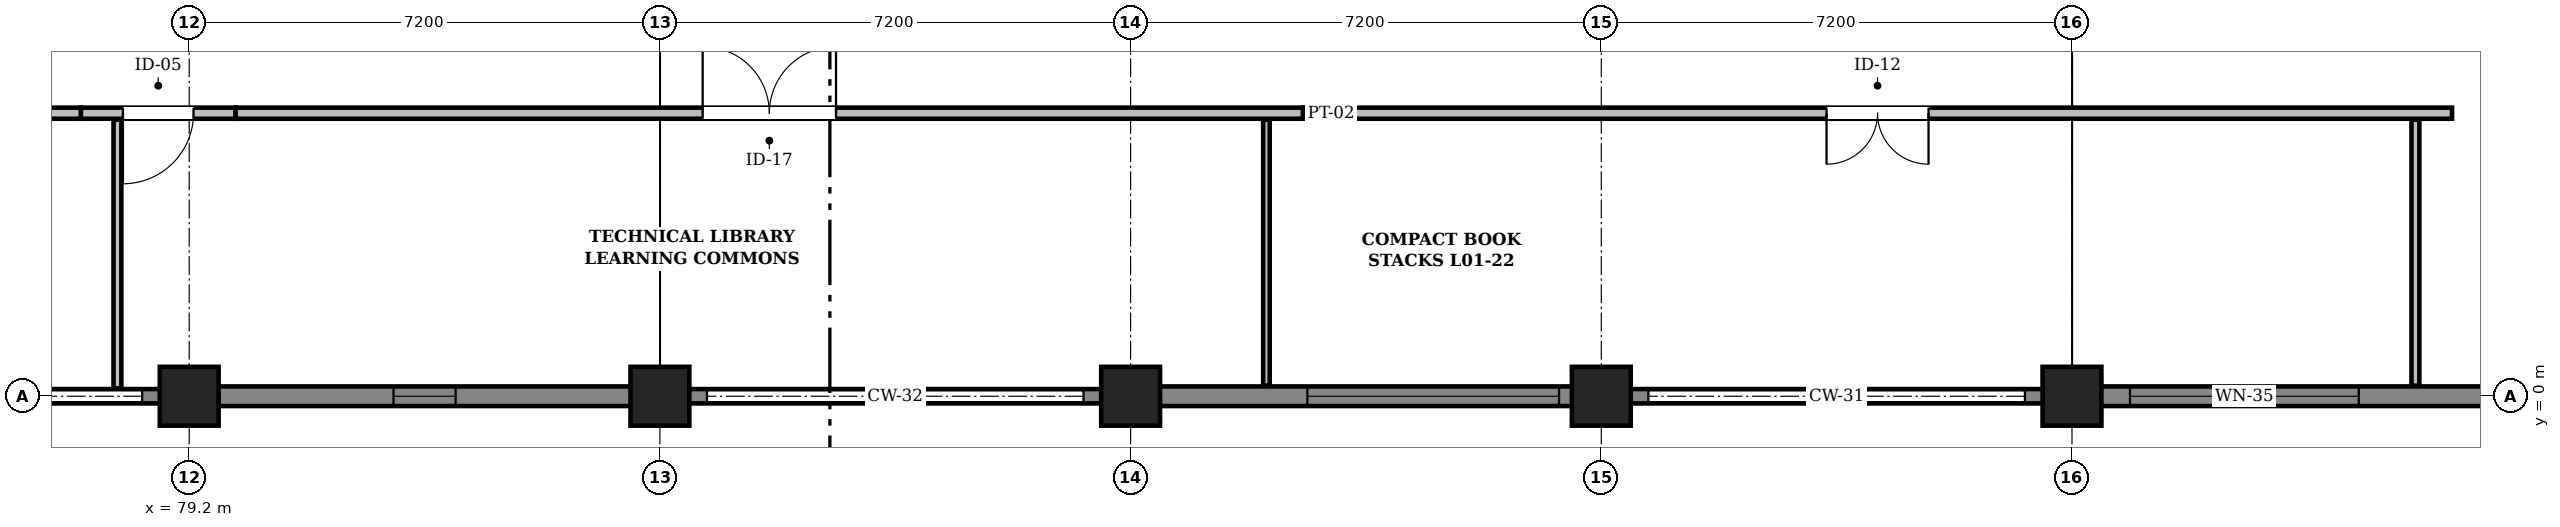
"""IFC4 building model, lengths in metres.
Left out: names, types, materials, properties, quantities, classifications, styles, units other than length and angle.
Written with IfcOpenShell. Run it as: python <this file> out.ifc"""

import sys

from ifc_helpers import new_model, si_unit, direction, frame, frame_2d, origin, origin_2d, place, context, subcontext, project, spatial, rectangle, extrude, element, fill, save


model = new_model("IFC4")
c1 = context("Model", 3, precision=1e-05, world=origin(), true_north=direction((0.0, 1.0)))
c2 = subcontext(c1, "Body", "Model", "MODEL_VIEW")
j1 = project(units=[si_unit("LENGTHUNIT", "METRE"), si_unit("PLANEANGLEUNIT", "RADIAN")], contexts=[c1])
p1 = place(None, origin())
s1 = spatial("IfcSite", under=j1, at=p1, CompositionType="ELEMENT")
p2 = place(p1, origin())
s2 = spatial("IfcBuilding", under=s1, at=p2, CompositionType="ELEMENT")
p3 = place(p2, frame((0.0, 0.0, 4.8)))
s3 = spatial("IfcBuildingStorey", under=s2, at=p3, CompositionType="ELEMENT", Elevation=4.8)
for number, where, z_axis, x_axis in (
    (1, (79.2, 0.0, 0.0), (0.0, 0.0, 1.0), (1.0, 0.0, 0.0)),
    (2, (86.4, 0.0, 0.0), (0.0, 0.0, 1.0), (1.0, 0.0, 0.0)),
    (3, (93.6, 0.0, 0.0), (0.0, 0.0, 1.0), (1.0, 0.0, 0.0)),
    (4, (100.8, 0.0, 0.0), (0.0, 0.0, 1.0), (1.0, 0.0, 0.0)),
    (5, (108.0, 0.0, 0.0), (0.0, 0.0, 1.0), (1.0, 0.0, 0.0)),
):
    element("IfcColumn", number, at=place(p3, frame(where, z_axis=z_axis, x_axis=x_axis)), inside=s3, PredefinedType="COLUMN", context=c2, shape_type="SweptSolid", body=[
        extrude(rectangle(XDim=0.9, YDim=0.9, at=origin_2d()), origin(), (0.0, 0.0, 1.0), 4.8),
    ])
p4 = place(p3, frame((115.2, 0.0, 0.0), z_axis=(0.0, 0.0, 1.0), x_axis=(-1.0, 0.0, 0.0)))
e6 = element("IfcWall", 6, at=p4, inside=s3, PredefinedType="SOLIDWALL", context=c2, shape_type="SweptSolid", body=[
    extrude(rectangle(XDim=7.2, YDim=0.3, at=frame_2d((3.6, 0.0))), origin(), (0.0, 0.0, 1.0), 4.52),
])
p5 = place(p4, frame((2.813, 0.0, 0.95)))
e7 = element("IfcOpeningElement", 7, at=p5, cuts=e6, PredefinedType="OPENING", context=c2, shape_type="SweptSolid", body=[
    extrude(rectangle(XDim=3.5, YDim=1.8, at=frame_2d((1.75, 0.9))), frame((0.0, 0.162, 0.0), z_axis=(0.0, -1.0, 0.0), x_axis=(1.0, 0.0, 0.0)), (0.0, 0.0, 1.0), 0.324),
])
p6 = place(p3, frame((108.0, 0.0, 0.0), z_axis=(0.0, 0.0, 1.0), x_axis=(-1.0, 0.0, 0.0)))
e8 = element("IfcWall", 8, at=p6, inside=s3, PredefinedType="SOLIDWALL", context=c2, shape_type="SweptSolid", body=[
    extrude(rectangle(XDim=7.2, YDim=0.22, at=frame_2d((3.6, 0.0))), origin(), (0.0, 0.0, 1.0), 1.24),
])
p7 = place(p3, frame((100.8, 0.0, 0.0), z_axis=(0.0, 0.0, 1.0), x_axis=(-1.0, 0.0, 0.0)))
e9 = element("IfcWall", 9, at=p7, inside=s3, PredefinedType="SOLIDWALL", context=c2, shape_type="SweptSolid", body=[
    extrude(rectangle(XDim=7.2, YDim=0.3, at=frame_2d((3.6, 0.0))), origin(), (0.0, 0.0, 1.0), 4.52),
])
p8 = place(p7, frame((0.646, 0.0, 0.95)))
e10 = element("IfcOpeningElement", 10, at=p8, cuts=e9, PredefinedType="OPENING", context=c2, shape_type="SweptSolid", body=[
    extrude(rectangle(XDim=3.85, YDim=1.8, at=frame_2d((1.925, 0.9))), frame((0.0, 0.162, 0.0), z_axis=(0.0, -1.0, 0.0), x_axis=(1.0, 0.0, 0.0)), (0.0, 0.0, 1.0), 0.324),
])
p9 = place(p3, frame((93.6, 0.0, 0.0), z_axis=(0.0, 0.0, 1.0), x_axis=(-1.0, 0.0, 0.0)))
e11 = element("IfcWall", 11, at=p9, inside=s3, PredefinedType="SOLIDWALL", context=c2, shape_type="SweptSolid", body=[
    extrude(rectangle(XDim=7.2, YDim=0.22, at=frame_2d((3.6, 0.0))), origin(), (0.0, 0.0, 1.0), 1.24),
])
p10 = place(p3, frame((86.4, 0.0, 0.0), z_axis=(0.0, 0.0, 1.0), x_axis=(-1.0, 0.0, 0.0)))
e12 = element("IfcWall", 12, at=p10, inside=s3, PredefinedType="SOLIDWALL", context=c2, shape_type="SweptSolid", body=[
    extrude(rectangle(XDim=7.2, YDim=0.3, at=frame_2d((3.6, 0.0))), origin(), (0.0, 0.0, 1.0), 4.52),
])
p11 = place(p10, frame((3.125, 0.0, 0.95)))
e13 = element("IfcOpeningElement", 13, at=p11, cuts=e12, PredefinedType="OPENING", context=c2, shape_type="SweptSolid", body=[
    extrude(rectangle(XDim=0.95, YDim=2.05, at=frame_2d((0.475, 1.025))), frame((0.0, 0.162, 0.0), z_axis=(0.0, -1.0, 0.0), x_axis=(1.0, 0.0, 0.0)), (0.0, 0.0, 1.0), 0.324),
])
p12 = place(p3, frame((79.2, 0.0, 0.0), z_axis=(0.0, 0.0, 1.0), x_axis=(-1.0, 0.0, 0.0)))
e14 = element("IfcWall", 14, at=p12, inside=s3, PredefinedType="SOLIDWALL", context=c2, shape_type="SweptSolid", body=[
    extrude(rectangle(XDim=7.2, YDim=0.22, at=frame_2d((3.6, 0.0))), origin(), (0.0, 0.0, 1.0), 1.24),
])
p13 = place(p3, frame((77.542, 4.33, 0.0), z_axis=(0.0, 0.0, 1.0), x_axis=(1.0, 0.0, 0.0)))
e15 = element("IfcWall", 15, at=p13, inside=s3, PredefinedType="PARTITIONING", context=c2, shape_type="SweptSolid", body=[
    extrude(rectangle(XDim=2.368, YDim=0.17, at=frame_2d((1.184, 0.0))), origin(), (0.0, 0.0, 1.0), 4.46),
])
p14 = place(p13, frame((0.644, 0.0, 0.0)))
e16 = element("IfcOpeningElement", 16, at=p14, cuts=e15, PredefinedType="OPENING", context=c2, shape_type="SweptSolid", body=[
    extrude(rectangle(XDim=1.08, YDim=2.2, at=frame_2d((0.54, 1.1))), frame((0.0, 0.097, 0.0), z_axis=(0.0, -1.0, 0.0), x_axis=(1.0, 0.0, 0.0)), (0.0, 0.0, 1.0), 0.194),
])
p15 = place(p3, frame((79.91, 4.33, 0.0), z_axis=(0.0, 0.0, 1.0), x_axis=(1.0, 0.0, 0.0)))
e17 = element("IfcWall", 17, at=p15, inside=s3, PredefinedType="PARTITIONING", context=c2, shape_type="SweptSolid", body=[
    extrude(rectangle(XDim=16.328, YDim=0.17, at=frame_2d((8.164, 0.0))), origin(), (0.0, 0.0, 1.0), 4.46),
])
p16 = place(p15, frame((7.144, 0.0, 0.0)))
e18 = element("IfcOpeningElement", 18, at=p16, cuts=e17, PredefinedType="OPENING", context=c2, shape_type="SweptSolid", body=[
    extrude(rectangle(XDim=2.04, YDim=2.34, at=frame_2d((1.02, 1.17))), frame((0.0, 0.097, 0.0), z_axis=(0.0, -1.0, 0.0), x_axis=(1.0, 0.0, 0.0)), (0.0, 0.0, 1.0), 0.194),
])
p17 = place(p3, frame((96.238, 4.33, 0.0), z_axis=(0.0, 0.0, 1.0), x_axis=(1.0, 0.0, 0.0)))
e19 = element("IfcWall", 19, at=p17, inside=s3, PredefinedType="PARTITIONING", context=c2, shape_type="SweptSolid", body=[
    extrude(rectangle(XDim=17.575, YDim=0.17, at=frame_2d((8.788, 0.0))), origin(), (0.0, 0.0, 1.0), 4.46),
])
p18 = place(p17, frame((8.008, 0.0, 0.0)))
e20 = element("IfcOpeningElement", 20, at=p18, cuts=e19, PredefinedType="OPENING", context=c2, shape_type="SweptSolid", body=[
    extrude(rectangle(XDim=1.56, YDim=2.26, at=frame_2d((0.78, 1.13))), frame((0.0, 0.097, 0.0), z_axis=(0.0, -1.0, 0.0), x_axis=(1.0, 0.0, 0.0)), (0.0, 0.0, 1.0), 0.194),
])
p19 = place(p3, frame((61.098, 4.33, 0.0), z_axis=(0.0, 0.0, 1.0), x_axis=(1.0, 0.0, 0.0)))
e21 = element("IfcWall", 21, at=p19, inside=s3, PredefinedType="PARTITIONING", context=c2, shape_type="SweptSolid", body=[
    extrude(rectangle(XDim=16.444, YDim=0.17, at=frame_2d((8.222, 0.0))), origin(), (0.0, 0.0, 1.0), 4.46),
])
p20 = place(p19, frame((7.262, 0.0, 0.0)))
e22 = element("IfcOpeningElement", 22, at=p20, cuts=e21, PredefinedType="OPENING", context=c2, shape_type="SweptSolid", body=[
    extrude(rectangle(XDim=1.92, YDim=2.32, at=frame_2d((0.96, 1.16))), frame((0.0, 0.097, 0.0), z_axis=(0.0, -1.0, 0.0), x_axis=(1.0, 0.0, 0.0)), (0.0, 0.0, 1.0), 0.194),
])
p21 = place(p3, frame((78.102, 0.122, 0.0), z_axis=(0.0, 0.0, 1.0), x_axis=(0.0, 1.0, 0.0)))
e23 = element("IfcWall", 23, at=p21, inside=s3, PredefinedType="PARTITIONING", context=c2, shape_type="SweptSolid", body=[
    extrude(rectangle(XDim=4.108, YDim=0.12, at=frame_2d((2.054, 0.0))), origin(), (0.0, 0.0, 1.0), 4.46),
])
p22 = place(p3, frame((95.678, 0.162, 0.0), z_axis=(0.0, 0.0, 1.0), x_axis=(0.0, 1.0, 0.0)))
e24 = element("IfcWall", 24, at=p22, inside=s3, PredefinedType="PARTITIONING", context=c2, shape_type="SweptSolid", body=[
    extrude(rectangle(XDim=4.068, YDim=0.1, at=frame_2d((2.034, 0.0))), origin(), (0.0, 0.0, 1.0), 4.46),
])
p23 = place(p3, frame((113.253, 0.162, 0.0), z_axis=(0.0, 0.0, 1.0), x_axis=(0.0, 1.0, 0.0)))
e25 = element("IfcWall", 25, at=p23, inside=s3, PredefinedType="PARTITIONING", context=c2, shape_type="SweptSolid", body=[
    extrude(rectangle(XDim=4.068, YDim=0.12, at=frame_2d((2.034, 0.0))), origin(), (0.0, 0.0, 1.0), 4.46),
])
p24 = place(p5, origin())
e26 = element("IfcWindow", 26, at=p24, inside=s3, PartitioningType="SINGLE_PANEL", PredefinedType="WINDOW", context=c2, shape_type="SweptSolid", body=[
    extrude(rectangle(XDim=3.5, YDim=1.8, at=frame_2d((1.75, 0.9))), frame((0.0, 0.03, 0.0), z_axis=(0.0, -1.0, 0.0), x_axis=(1.0, 0.0, 0.0)), (0.0, 0.0, 1.0), 0.06),
])
fill(e7, e26)
p25 = place(p8, origin())
e27 = element("IfcWindow", 27, at=p25, inside=s3, PartitioningType="SINGLE_PANEL", PredefinedType="WINDOW", context=c2, shape_type="SweptSolid", body=[
    extrude(rectangle(XDim=3.85, YDim=1.8, at=frame_2d((1.925, 0.9))), frame((0.0, 0.03, 0.0), z_axis=(0.0, -1.0, 0.0), x_axis=(1.0, 0.0, 0.0)), (0.0, 0.0, 1.0), 0.06),
])
fill(e10, e27)
p26 = place(p11, origin())
e28 = element("IfcWindow", 28, at=p26, inside=s3, PartitioningType="SINGLE_PANEL", PredefinedType="WINDOW", context=c2, shape_type="SweptSolid", body=[
    extrude(rectangle(XDim=0.95, YDim=2.05, at=frame_2d((0.475, 1.025))), frame((0.0, 0.03, 0.0), z_axis=(0.0, -1.0, 0.0), x_axis=(1.0, 0.0, 0.0)), (0.0, 0.0, 1.0), 0.06),
])
fill(e13, e28)
p27 = place(p16, origin())
e29 = element("IfcDoor", 29, at=p27, inside=s3, OperationType="DOUBLE_DOOR_SINGLE_SWING", PredefinedType="DOOR", context=c2, shape_type="SweptSolid", body=[
    extrude(rectangle(XDim=2.04, YDim=2.34, at=frame_2d((1.02, 1.17))), frame((0.0, 0.025, 0.0), z_axis=(0.0, -1.0, 0.0), x_axis=(1.0, 0.0, 0.0)), (0.0, 0.0, 1.0), 0.05),
])
fill(e18, e29)
p28 = place(p14, frame((1.08, 0.0, 0.0), z_axis=(0.0, 0.0, 1.0), x_axis=(-1.0, 0.0, 0.0)))
e30 = element("IfcDoor", 30, at=p28, inside=s3, OperationType="SINGLE_SWING_RIGHT", PredefinedType="DOOR", context=c2, shape_type="SweptSolid", body=[
    extrude(rectangle(XDim=1.08, YDim=2.2, at=frame_2d((0.54, 1.1))), frame((0.0, 0.025, 0.0), z_axis=(0.0, -1.0, 0.0), x_axis=(1.0, 0.0, 0.0)), (0.0, 0.0, 1.0), 0.05),
])
fill(e16, e30)
p29 = place(p18, frame((1.56, 0.0, 0.0), z_axis=(0.0, 0.0, 1.0), x_axis=(-1.0, 0.0, 0.0)))
e31 = element("IfcDoor", 31, at=p29, inside=s3, OperationType="DOUBLE_DOOR_SINGLE_SWING", PredefinedType="DOOR", context=c2, shape_type="SweptSolid", body=[
    extrude(rectangle(XDim=1.56, YDim=2.26, at=frame_2d((0.78, 1.13))), frame((0.0, 0.025, 0.0), z_axis=(0.0, -1.0, 0.0), x_axis=(1.0, 0.0, 0.0)), (0.0, 0.0, 1.0), 0.05),
])
fill(e20, e31)
save(model, sys.argv[1])
